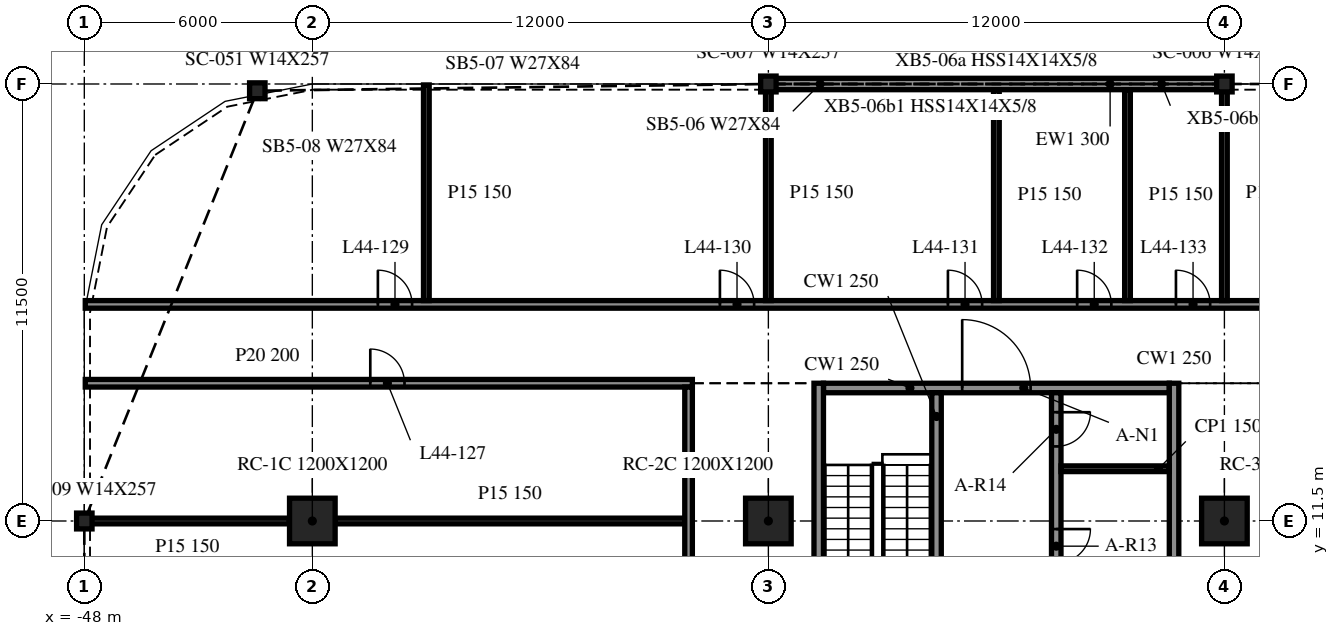
"""IFC4 building model, lengths in metres.
Left out: names, types, materials, properties, quantities, classifications, styles, units other than length and angle.
Written with IfcOpenShell. Run it as: python <this file> out.ifc"""

import sys

from ifc_helpers import new_model, si_unit, direction, frame, frame_2d, origin, origin_2d, place, context, subcontext, project, spatial, rectangle, i_section, extrude, element, fill, save


model = new_model("IFC4")
c1 = context("Model", 3, precision=1e-05, world=origin(), true_north=direction((0.0, 1.0)))
c2 = subcontext(c1, "Body", "Model", "MODEL_VIEW")
j1 = project(units=[si_unit("LENGTHUNIT", "METRE"), si_unit("PLANEANGLEUNIT", "RADIAN")], contexts=[c1])
p1 = place(None, origin())
s1 = spatial("IfcSite", under=j1, at=p1, CompositionType="ELEMENT")
p2 = place(p1, origin())
s2 = spatial("IfcBuilding", under=s1, at=p2, CompositionType="ELEMENT")
p3 = place(p2, frame((0.0, 0.0, 185.8)))
s3 = spatial("IfcBuildingStorey", under=s2, at=p3, CompositionType="ELEMENT", Elevation=185.8)
for number, where, z_axis, x_axis in (
    (1, (-42.0, 11.5, -0.34), (0.0, 0.0, 1.0), (1.0, 0.0, 0.0)),
    (2, (-30.0, 11.5, -0.34), (0.0, 0.0, 1.0), (1.0, 0.0, 0.0)),
    (3, (-18.0, 11.5, -0.34), (0.0, 0.0, 1.0), (1.0, 0.0, 0.0)),
):
    element("IfcColumn", number, at=place(p3, frame(where, z_axis=z_axis, x_axis=x_axis)), inside=s3, PredefinedType="COLUMN", context=c2, shape_type="SweptSolid", body=[
        extrude(rectangle(XDim=1.2, YDim=1.2, at=origin_2d()), origin(), (0.0, 0.0, 1.0), 3.74),
    ])
for number, where, z_axis, x_axis in (
    (4, (-18.0, 23.0, -0.34), (0.0, 0.0, 1.0), (1.0, 0.0, 0.0)),
    (5, (-30.0, 23.0, -0.34), (0.0, 0.0, 1.0), (1.0, 0.0, 0.0)),
    (6, (-43.448, 22.822, -0.34), (0.0, 0.0, 1.0), (1.0, 0.0, 0.0)),
    (7, (-48.0, 11.5, -0.34), (0.0, 0.0, 1.0), (1.0, 0.0, 0.0)),
):
    element("IfcColumn", number, at=place(p3, frame(where, z_axis=z_axis, x_axis=x_axis)), inside=s3, PredefinedType="COLUMN", context=c2, shape_type="SweptSolid", body=[
        extrude(i_section(OverallWidth=0.406, OverallDepth=0.417, WebThickness=0.03, FlangeThickness=0.048, at=origin_2d()), origin(), (0.0, 0.0, 1.0), 3.74),
    ])
p4 = place(p3, frame((-18.015, 23.0, 0.0), z_axis=(0.0, 0.0, 1.0), x_axis=(-1.0, 0.0, 0.0)))
e8 = element("IfcWall", 8, at=p4, inside=s3, PredefinedType="NOTDEFINED", context=c2, shape_type="SweptSolid", body=[
    extrude(rectangle(XDim=11.97, YDim=0.3, at=frame_2d((5.985, 0.0))), origin(), (0.0, 0.0, 1.0), 3.4),
])
for number, where, z_axis, x_axis in (
    (9, (-28.675, 15.125, 0.0), (0.0, 0.0, 1.0), (0.0, -1.0, 0.0)),
    (10, (-19.325, -9.125, 0.0), (0.0, 0.0, 1.0), (0.0, 1.0, 0.0)),
):
    element("IfcWall", number, at=place(p3, frame(where, z_axis=z_axis, x_axis=x_axis)), inside=s3, PredefinedType="SOLIDWALL", context=c2, shape_type="SweptSolid", body=[
        extrude(rectangle(XDim=24.25, YDim=0.25, at=frame_2d((12.125, 0.0))), origin(), (0.0, 0.0, 1.0), 3.4),
    ])
p5 = place(p3, frame((-28.55, 15.0, 0.0), z_axis=(0.0, 0.0, 1.0), x_axis=(1.0, 0.0, 0.0)))
e11 = element("IfcWall", 11, at=p5, inside=s3, PredefinedType="SOLIDWALL", context=c2, shape_type="SweptSolid", body=[
    extrude(rectangle(XDim=9.1, YDim=0.25, at=frame_2d((4.55, 0.0))), origin(), (0.0, 0.0, 1.0), 3.4),
])
p6 = place(p5, frame((3.65, 0.0, 0.0)))
e12 = element("IfcOpeningElement", 12, at=p6, cuts=e11, PredefinedType="OPENING", context=c2, shape_type="SweptSolid", body=[
    extrude(rectangle(XDim=1.8, YDim=2.1, at=frame_2d((0.9, 1.05))), frame((0.0, 0.135, 0.0), z_axis=(0.0, -1.0, 0.0), x_axis=(1.0, 0.0, 0.0)), (0.0, 0.0, 1.0), 0.27),
])
p7 = place(p3, frame((-25.575, 14.875, 0.0), z_axis=(0.0, 0.0, 1.0), x_axis=(0.0, -1.0, 0.0)))
e13 = element("IfcWall", 13, at=p7, inside=s3, PredefinedType="SOLIDWALL", context=c2, shape_type="SweptSolid", body=[
    extrude(rectangle(XDim=6.25, YDim=0.25, at=frame_2d((3.125, 0.0))), origin(), (0.0, 0.0, 1.0), 3.4),
])
p8 = place(p7, frame((4.85, 0.0, 0.0)))
e14 = element("IfcOpeningElement", 14, at=p8, cuts=e13, PredefinedType="OPENING", context=c2, shape_type="SweptSolid", body=[
    extrude(rectangle(XDim=1.0, YDim=2.1, at=frame_2d((0.5, 1.05))), frame((0.0, 0.135, 0.0), z_axis=(0.0, -1.0, 0.0), x_axis=(1.0, 0.0, 0.0)), (0.0, 0.0, 1.0), 0.27),
])
p9 = place(p3, frame((-22.425, 14.875, 0.0), z_axis=(0.0, 0.0, 1.0), x_axis=(0.0, -1.0, 0.0)))
e15 = element("IfcWall", 15, at=p9, inside=s3, PredefinedType="SOLIDWALL", context=c2, shape_type="SweptSolid", body=[
    extrude(rectangle(XDim=23.75, YDim=0.25, at=frame_2d((11.875, 0.0))), origin(), (0.0, 0.0, 1.0), 3.4),
])
p10 = place(p9, frame((15.01, 0.0, 0.0)))
e16 = element("IfcOpeningElement", 16, at=p10, cuts=e15, PredefinedType="OPENING", context=c2, shape_type="SweptSolid", body=[
    extrude(rectangle(XDim=0.9, YDim=2.1, at=frame_2d((0.45, 1.05))), frame((0.0, 0.135, 0.0), z_axis=(0.0, -1.0, 0.0), x_axis=(1.0, 0.0, 0.0)), (0.0, 0.0, 1.0), 0.27),
])
p11 = place(p9, frame((11.371, 0.0, 0.0)))
e17 = element("IfcOpeningElement", 17, at=p11, cuts=e15, PredefinedType="OPENING", context=c2, shape_type="SweptSolid", body=[
    extrude(rectangle(XDim=0.9, YDim=2.1, at=frame_2d((0.45, 1.05))), frame((0.0, 0.135, 0.0), z_axis=(0.0, -1.0, 0.0), x_axis=(1.0, 0.0, 0.0)), (0.0, 0.0, 1.0), 0.27),
])
p12 = place(p9, frame((7.786, 0.0, 0.0)))
e18 = element("IfcOpeningElement", 18, at=p12, cuts=e15, PredefinedType="OPENING", context=c2, shape_type="SweptSolid", body=[
    extrude(rectangle(XDim=0.9, YDim=2.1, at=frame_2d((0.45, 1.05))), frame((0.0, 0.135, 0.0), z_axis=(0.0, -1.0, 0.0), x_axis=(1.0, 0.0, 0.0)), (0.0, 0.0, 1.0), 0.27),
])
p13 = place(p9, frame((22.337, 0.0, 0.0)))
e19 = element("IfcOpeningElement", 19, at=p13, cuts=e15, PredefinedType="OPENING", context=c2, shape_type="SweptSolid", body=[
    extrude(rectangle(XDim=0.9, YDim=2.1, at=frame_2d((0.45, 1.05))), frame((0.0, 0.135, 0.0), z_axis=(0.0, -1.0, 0.0), x_axis=(1.0, 0.0, 0.0)), (0.0, 0.0, 1.0), 0.27),
])
p14 = place(p9, frame((20.3, 0.0, 0.0)))
e20 = element("IfcOpeningElement", 20, at=p14, cuts=e15, PredefinedType="OPENING", context=c2, shape_type="SweptSolid", body=[
    extrude(rectangle(XDim=0.9, YDim=2.1, at=frame_2d((0.45, 1.05))), frame((0.0, 0.135, 0.0), z_axis=(0.0, -1.0, 0.0), x_axis=(1.0, 0.0, 0.0)), (0.0, 0.0, 1.0), 0.27),
])
p15 = place(p9, frame((18.262, 0.0, 0.0)))
e21 = element("IfcOpeningElement", 21, at=p15, cuts=e15, PredefinedType="OPENING", context=c2, shape_type="SweptSolid", body=[
    extrude(rectangle(XDim=0.9, YDim=2.1, at=frame_2d((0.45, 1.05))), frame((0.0, 0.135, 0.0), z_axis=(0.0, -1.0, 0.0), x_axis=(1.0, 0.0, 0.0)), (0.0, 0.0, 1.0), 0.27),
])
p16 = place(p9, frame((3.587, 0.0, 0.0)))
e22 = element("IfcOpeningElement", 22, at=p16, cuts=e15, PredefinedType="OPENING", context=c2, shape_type="SweptSolid", body=[
    extrude(rectangle(XDim=0.9, YDim=2.1, at=frame_2d((0.45, 1.05))), frame((0.0, 0.135, 0.0), z_axis=(0.0, -1.0, 0.0), x_axis=(1.0, 0.0, 0.0)), (0.0, 0.0, 1.0), 0.27),
])
p17 = place(p9, frame((0.512, 0.0, 0.0)))
e23 = element("IfcOpeningElement", 23, at=p17, cuts=e15, PredefinedType="OPENING", context=c2, shape_type="SweptSolid", body=[
    extrude(rectangle(XDim=0.9, YDim=2.1, at=frame_2d((0.45, 1.05))), frame((0.0, 0.135, 0.0), z_axis=(0.0, -1.0, 0.0), x_axis=(1.0, 0.0, 0.0)), (0.0, 0.0, 1.0), 0.27),
])
p18 = place(p3, frame((-22.3, 12.875, 0.0), z_axis=(0.0, 0.0, 1.0), x_axis=(1.0, 0.0, 0.0)))
e24 = element("IfcWall", 24, at=p18, inside=s3, PredefinedType="PARTITIONING", context=c2, shape_type="SweptSolid", body=[
    extrude(rectangle(XDim=2.85, YDim=0.15, at=frame_2d((1.425, 0.0))), origin(), (0.0, 0.0, 1.0), 3.4),
])
p19 = place(p3, frame((-47.975, 11.5, 0.0), z_axis=(0.0, 0.0, 1.0), x_axis=(1.0, 0.0, 0.0)))
e25 = element("IfcWall", 25, at=p19, inside=s3, PredefinedType="PARTITIONING", context=c2, shape_type="SweptSolid", body=[
    extrude(rectangle(XDim=5.375, YDim=0.15, at=frame_2d((2.688, 0.0))), origin(), (0.0, 0.0, 1.0), 3.4),
])
p20 = place(p3, frame((-41.4, 11.5, 0.0), z_axis=(0.0, 0.0, 1.0), x_axis=(1.0, 0.0, 0.0)))
e26 = element("IfcWall", 26, at=p20, inside=s3, PredefinedType="PARTITIONING", context=c2, shape_type="SweptSolid", body=[
    extrude(rectangle(XDim=9.2, YDim=0.15, at=frame_2d((4.6, 0.0))), origin(), (0.0, 0.0, 1.0), 3.4),
])
p21 = place(p3, frame((-47.975, 15.125, 0.0), z_axis=(0.0, 0.0, 1.0), x_axis=(1.0, 0.0, 0.0)))
e27 = element("IfcWall", 27, at=p21, inside=s3, PredefinedType="PARTITIONING", context=c2, shape_type="SweptSolid", body=[
    extrude(rectangle(XDim=15.975, YDim=0.2, at=frame_2d((7.988, 0.0))), origin(), (0.0, 0.0, 1.0), 3.4),
])
p22 = place(p21, frame((7.5, 0.0, 0.0)))
e28 = element("IfcOpeningElement", 28, at=p22, cuts=e27, PredefinedType="OPENING", context=c2, shape_type="SweptSolid", body=[
    extrude(rectangle(XDim=0.9, YDim=2.1, at=frame_2d((0.45, 1.05))), frame((0.0, 0.11, 0.0), z_axis=(0.0, -1.0, 0.0), x_axis=(1.0, 0.0, 0.0)), (0.0, 0.0, 1.0), 0.22),
])
p23 = place(p3, frame((-47.975, 17.2, 0.0), z_axis=(0.0, 0.0, 1.0), x_axis=(1.0, 0.0, 0.0)))
e29 = element("IfcWall", 29, at=p23, inside=s3, PredefinedType="PARTITIONING", context=c2, shape_type="SweptSolid", body=[
    extrude(rectangle(XDim=95.95, YDim=0.2, at=frame_2d((47.975, 0.0))), origin(), (0.0, 0.0, 1.0), 3.4),
])
p24 = place(p23, frame((7.7, 0.0, 0.0)))
e30 = element("IfcOpeningElement", 30, at=p24, cuts=e29, PredefinedType="OPENING", context=c2, shape_type="SweptSolid", body=[
    extrude(rectangle(XDim=0.9, YDim=2.1, at=frame_2d((0.45, 1.05))), frame((0.0, 0.11, 0.0), z_axis=(0.0, -1.0, 0.0), x_axis=(1.0, 0.0, 0.0)), (0.0, 0.0, 1.0), 0.22),
])
p25 = place(p23, frame((16.7, 0.0, 0.0)))
e31 = element("IfcOpeningElement", 31, at=p25, cuts=e29, PredefinedType="OPENING", context=c2, shape_type="SweptSolid", body=[
    extrude(rectangle(XDim=0.9, YDim=2.1, at=frame_2d((0.45, 1.05))), frame((0.0, 0.11, 0.0), z_axis=(0.0, -1.0, 0.0), x_axis=(1.0, 0.0, 0.0)), (0.0, 0.0, 1.0), 0.22),
])
p26 = place(p23, frame((22.7, 0.0, 0.0)))
e32 = element("IfcOpeningElement", 32, at=p26, cuts=e29, PredefinedType="OPENING", context=c2, shape_type="SweptSolid", body=[
    extrude(rectangle(XDim=0.9, YDim=2.1, at=frame_2d((0.45, 1.05))), frame((0.0, 0.11, 0.0), z_axis=(0.0, -1.0, 0.0), x_axis=(1.0, 0.0, 0.0)), (0.0, 0.0, 1.0), 0.22),
])
p27 = place(p23, frame((26.1, 0.0, 0.0)))
e33 = element("IfcOpeningElement", 33, at=p27, cuts=e29, PredefinedType="OPENING", context=c2, shape_type="SweptSolid", body=[
    extrude(rectangle(XDim=0.9, YDim=2.1, at=frame_2d((0.45, 1.05))), frame((0.0, 0.11, 0.0), z_axis=(0.0, -1.0, 0.0), x_axis=(1.0, 0.0, 0.0)), (0.0, 0.0, 1.0), 0.22),
])
p28 = place(p23, frame((28.7, 0.0, 0.0)))
e34 = element("IfcOpeningElement", 34, at=p28, cuts=e29, PredefinedType="OPENING", context=c2, shape_type="SweptSolid", body=[
    extrude(rectangle(XDim=0.9, YDim=2.1, at=frame_2d((0.45, 1.05))), frame((0.0, 0.11, 0.0), z_axis=(0.0, -1.0, 0.0), x_axis=(1.0, 0.0, 0.0)), (0.0, 0.0, 1.0), 0.22),
])
p29 = place(p23, frame((37.7, 0.0, 0.0)))
e35 = element("IfcOpeningElement", 35, at=p29, cuts=e29, PredefinedType="OPENING", context=c2, shape_type="SweptSolid", body=[
    extrude(rectangle(XDim=0.9, YDim=2.1, at=frame_2d((0.45, 1.05))), frame((0.0, 0.11, 0.0), z_axis=(0.0, -1.0, 0.0), x_axis=(1.0, 0.0, 0.0)), (0.0, 0.0, 1.0), 0.22),
])
p30 = place(p23, frame((46.7, 0.0, 0.0)))
e36 = element("IfcOpeningElement", 36, at=p30, cuts=e29, PredefinedType="OPENING", context=c2, shape_type="SweptSolid", body=[
    extrude(rectangle(XDim=0.9, YDim=2.1, at=frame_2d((0.45, 1.05))), frame((0.0, 0.11, 0.0), z_axis=(0.0, -1.0, 0.0), x_axis=(1.0, 0.0, 0.0)), (0.0, 0.0, 1.0), 0.22),
])
p31 = place(p23, frame((48.1, 0.0, 0.0)))
e37 = element("IfcOpeningElement", 37, at=p31, cuts=e29, PredefinedType="OPENING", context=c2, shape_type="SweptSolid", body=[
    extrude(rectangle(XDim=0.9, YDim=2.1, at=frame_2d((0.45, 1.05))), frame((0.0, 0.11, 0.0), z_axis=(0.0, -1.0, 0.0), x_axis=(1.0, 0.0, 0.0)), (0.0, 0.0, 1.0), 0.22),
])
p32 = place(p23, frame((54.1, 0.0, 0.0)))
e38 = element("IfcOpeningElement", 38, at=p32, cuts=e29, PredefinedType="OPENING", context=c2, shape_type="SweptSolid", body=[
    extrude(rectangle(XDim=0.9, YDim=2.1, at=frame_2d((0.45, 1.05))), frame((0.0, 0.11, 0.0), z_axis=(0.0, -1.0, 0.0), x_axis=(1.0, 0.0, 0.0)), (0.0, 0.0, 1.0), 0.22),
])
p33 = place(p23, frame((57.5, 0.0, 0.0)))
e39 = element("IfcOpeningElement", 39, at=p33, cuts=e29, PredefinedType="OPENING", context=c2, shape_type="SweptSolid", body=[
    extrude(rectangle(XDim=0.9, YDim=2.1, at=frame_2d((0.45, 1.05))), frame((0.0, 0.11, 0.0), z_axis=(0.0, -1.0, 0.0), x_axis=(1.0, 0.0, 0.0)), (0.0, 0.0, 1.0), 0.22),
])
p34 = place(p23, frame((60.1, 0.0, 0.0)))
e40 = element("IfcOpeningElement", 40, at=p34, cuts=e29, PredefinedType="OPENING", context=c2, shape_type="SweptSolid", body=[
    extrude(rectangle(XDim=0.9, YDim=2.1, at=frame_2d((0.45, 1.05))), frame((0.0, 0.11, 0.0), z_axis=(0.0, -1.0, 0.0), x_axis=(1.0, 0.0, 0.0)), (0.0, 0.0, 1.0), 0.22),
])
p35 = place(p23, frame((69.1, 0.0, 0.0)))
e41 = element("IfcOpeningElement", 41, at=p35, cuts=e29, PredefinedType="OPENING", context=c2, shape_type="SweptSolid", body=[
    extrude(rectangle(XDim=0.9, YDim=2.1, at=frame_2d((0.45, 1.05))), frame((0.0, 0.11, 0.0), z_axis=(0.0, -1.0, 0.0), x_axis=(1.0, 0.0, 0.0)), (0.0, 0.0, 1.0), 0.22),
])
p36 = place(p23, frame((78.1, 0.0, 0.0)))
e42 = element("IfcOpeningElement", 42, at=p36, cuts=e29, PredefinedType="OPENING", context=c2, shape_type="SweptSolid", body=[
    extrude(rectangle(XDim=0.9, YDim=2.1, at=frame_2d((0.45, 1.05))), frame((0.0, 0.11, 0.0), z_axis=(0.0, -1.0, 0.0), x_axis=(1.0, 0.0, 0.0)), (0.0, 0.0, 1.0), 0.22),
])
p37 = place(p23, frame((84.1, 0.0, 0.0)))
e43 = element("IfcOpeningElement", 43, at=p37, cuts=e29, PredefinedType="OPENING", context=c2, shape_type="SweptSolid", body=[
    extrude(rectangle(XDim=0.9, YDim=2.1, at=frame_2d((0.45, 1.05))), frame((0.0, 0.11, 0.0), z_axis=(0.0, -1.0, 0.0), x_axis=(1.0, 0.0, 0.0)), (0.0, 0.0, 1.0), 0.22),
])
p38 = place(p23, frame((87.5, 0.0, 0.0)))
e44 = element("IfcOpeningElement", 44, at=p38, cuts=e29, PredefinedType="OPENING", context=c2, shape_type="SweptSolid", body=[
    extrude(rectangle(XDim=0.9, YDim=2.1, at=frame_2d((0.45, 1.05))), frame((0.0, 0.11, 0.0), z_axis=(0.0, -1.0, 0.0), x_axis=(1.0, 0.0, 0.0)), (0.0, 0.0, 1.0), 0.22),
])
p39 = place(p23, frame((90.1, 0.0, 0.0)))
e45 = element("IfcOpeningElement", 45, at=p39, cuts=e29, PredefinedType="OPENING", context=c2, shape_type="SweptSolid", body=[
    extrude(rectangle(XDim=0.9, YDim=2.1, at=frame_2d((0.45, 1.05))), frame((0.0, 0.11, 0.0), z_axis=(0.0, -1.0, 0.0), x_axis=(1.0, 0.0, 0.0)), (0.0, 0.0, 1.0), 0.22),
])
p40 = place(p3, frame((-39.0, 17.3, 0.0), z_axis=(0.0, 0.0, 1.0), x_axis=(0.0, 1.0, 0.0)))
e46 = element("IfcWall", 46, at=p40, inside=s3, PredefinedType="PARTITIONING", context=c2, shape_type="SweptSolid", body=[
    extrude(rectangle(XDim=5.675, YDim=0.15, at=frame_2d((2.837, 0.0))), origin(), (0.0, 0.0, 1.0), 3.4),
])
p41 = place(p3, frame((-32.1, -9.025, 0.0), z_axis=(0.0, 0.0, 1.0), x_axis=(0.0, 1.0, 0.0)))
e47 = element("IfcWall", 47, at=p41, inside=s3, PredefinedType="PARTITIONING", context=c2, shape_type="SweptSolid", body=[
    extrude(rectangle(XDim=24.05, YDim=0.2, at=frame_2d((12.025, 0.0))), origin(), (0.0, 0.0, 1.0), 3.4),
])
p42 = place(p41, frame((11.5, 0.0, 0.0)))
e48 = element("IfcOpeningElement", 48, at=p42, cuts=e47, PredefinedType="OPENING", context=c2, shape_type="SweptSolid", body=[
    extrude(rectangle(XDim=1.0, YDim=2.1, at=frame_2d((0.5, 1.05))), frame((0.0, 0.11, 0.0), z_axis=(0.0, -1.0, 0.0), x_axis=(1.0, 0.0, 0.0)), (0.0, 0.0, 1.0), 0.22),
])
p43 = place(p3, frame((-30.0, 17.3, 0.0), z_axis=(0.0, 0.0, 1.0), x_axis=(0.0, 1.0, 0.0)))
e49 = element("IfcWall", 49, at=p43, inside=s3, PredefinedType="PARTITIONING", context=c2, shape_type="SweptSolid", body=[
    extrude(rectangle(XDim=5.675, YDim=0.15, at=frame_2d((2.837, 0.0))), origin(), (0.0, 0.0, 1.0), 3.4),
])
for number, where, z_axis, x_axis in (
    (50, (-24.0, 17.3, 0.0), (0.0, 0.0, 1.0), (0.0, 1.0, 0.0)),
    (51, (-20.55, 17.3, 0.0), (0.0, 0.0, 1.0), (0.0, 1.0, 0.0)),
):
    element("IfcWall", number, at=place(p3, frame(where, z_axis=z_axis, x_axis=x_axis)), inside=s3, PredefinedType="PARTITIONING", context=c2, shape_type="SweptSolid", body=[
        extrude(rectangle(XDim=5.55, YDim=0.15, at=frame_2d((2.775, 0.0))), origin(), (0.0, 0.0, 1.0), 3.4),
    ])
p44 = place(p3, frame((-18.0, 17.3, 0.0), z_axis=(0.0, 0.0, 1.0), x_axis=(0.0, 1.0, 0.0)))
e52 = element("IfcWall", 52, at=p44, inside=s3, PredefinedType="PARTITIONING", context=c2, shape_type="SweptSolid", body=[
    extrude(rectangle(XDim=5.675, YDim=0.15, at=frame_2d((2.837, 0.0))), origin(), (0.0, 0.0, 1.0), 3.4),
])
p45 = place(p6, origin())
e53 = element("IfcDoor", 53, at=p45, inside=s3, OperationType="DOUBLE_DOOR_SINGLE_SWING", PredefinedType="DOOR", context=c2, shape_type="SweptSolid", body=[
    extrude(rectangle(XDim=1.8, YDim=2.1, at=frame_2d((0.9, 1.05))), frame((0.0, 0.025, 0.0), z_axis=(0.0, -1.0, 0.0), x_axis=(1.0, 0.0, 0.0)), (0.0, 0.0, 1.0), 0.05),
])
fill(e12, e53)
p46 = place(p16, origin())
e54 = element("IfcDoor", 54, at=p46, inside=s3, OperationType="SINGLE_SWING_LEFT", PredefinedType="DOOR", context=c2, shape_type="SweptSolid", body=[
    extrude(rectangle(XDim=0.9, YDim=2.1, at=frame_2d((0.45, 1.05))), frame((0.0, 0.025, 0.0), z_axis=(0.0, -1.0, 0.0), x_axis=(1.0, 0.0, 0.0)), (0.0, 0.0, 1.0), 0.05),
])
fill(e22, e54)
p47 = place(p17, origin())
e55 = element("IfcDoor", 55, at=p47, inside=s3, OperationType="SINGLE_SWING_RIGHT", PredefinedType="DOOR", context=c2, shape_type="SweptSolid", body=[
    extrude(rectangle(XDim=0.9, YDim=2.1, at=frame_2d((0.45, 1.05))), frame((0.0, 0.025, 0.0), z_axis=(0.0, -1.0, 0.0), x_axis=(1.0, 0.0, 0.0)), (0.0, 0.0, 1.0), 0.05),
])
fill(e23, e55)
p48 = place(p22, origin())
e56 = element("IfcDoor", 56, at=p48, inside=s3, OperationType="SINGLE_SWING_LEFT", PredefinedType="DOOR", context=c2, shape_type="SweptSolid", body=[
    extrude(rectangle(XDim=0.9, YDim=2.1, at=frame_2d((0.45, 1.05))), frame((0.0, 0.025, 0.0), z_axis=(0.0, -1.0, 0.0), x_axis=(1.0, 0.0, 0.0)), (0.0, 0.0, 1.0), 0.05),
])
fill(e28, e56)
p49 = place(p24, origin())
e57 = element("IfcDoor", 57, at=p49, inside=s3, OperationType="SINGLE_SWING_LEFT", PredefinedType="DOOR", context=c2, shape_type="SweptSolid", body=[
    extrude(rectangle(XDim=0.9, YDim=2.1, at=frame_2d((0.45, 1.05))), frame((0.0, 0.025, 0.0), z_axis=(0.0, -1.0, 0.0), x_axis=(1.0, 0.0, 0.0)), (0.0, 0.0, 1.0), 0.05),
])
fill(e30, e57)
p50 = place(p25, origin())
e58 = element("IfcDoor", 58, at=p50, inside=s3, OperationType="SINGLE_SWING_LEFT", PredefinedType="DOOR", context=c2, shape_type="SweptSolid", body=[
    extrude(rectangle(XDim=0.9, YDim=2.1, at=frame_2d((0.45, 1.05))), frame((0.0, 0.025, 0.0), z_axis=(0.0, -1.0, 0.0), x_axis=(1.0, 0.0, 0.0)), (0.0, 0.0, 1.0), 0.05),
])
fill(e31, e58)
p51 = place(p26, origin())
e59 = element("IfcDoor", 59, at=p51, inside=s3, OperationType="SINGLE_SWING_LEFT", PredefinedType="DOOR", context=c2, shape_type="SweptSolid", body=[
    extrude(rectangle(XDim=0.9, YDim=2.1, at=frame_2d((0.45, 1.05))), frame((0.0, 0.025, 0.0), z_axis=(0.0, -1.0, 0.0), x_axis=(1.0, 0.0, 0.0)), (0.0, 0.0, 1.0), 0.05),
])
fill(e32, e59)
p52 = place(p27, origin())
e60 = element("IfcDoor", 60, at=p52, inside=s3, OperationType="SINGLE_SWING_LEFT", PredefinedType="DOOR", context=c2, shape_type="SweptSolid", body=[
    extrude(rectangle(XDim=0.9, YDim=2.1, at=frame_2d((0.45, 1.05))), frame((0.0, 0.025, 0.0), z_axis=(0.0, -1.0, 0.0), x_axis=(1.0, 0.0, 0.0)), (0.0, 0.0, 1.0), 0.05),
])
fill(e33, e60)
p53 = place(p28, origin())
e61 = element("IfcDoor", 61, at=p53, inside=s3, OperationType="SINGLE_SWING_LEFT", PredefinedType="DOOR", context=c2, shape_type="SweptSolid", body=[
    extrude(rectangle(XDim=0.9, YDim=2.1, at=frame_2d((0.45, 1.05))), frame((0.0, 0.025, 0.0), z_axis=(0.0, -1.0, 0.0), x_axis=(1.0, 0.0, 0.0)), (0.0, 0.0, 1.0), 0.05),
])
fill(e34, e61)
save(model, sys.argv[1])
